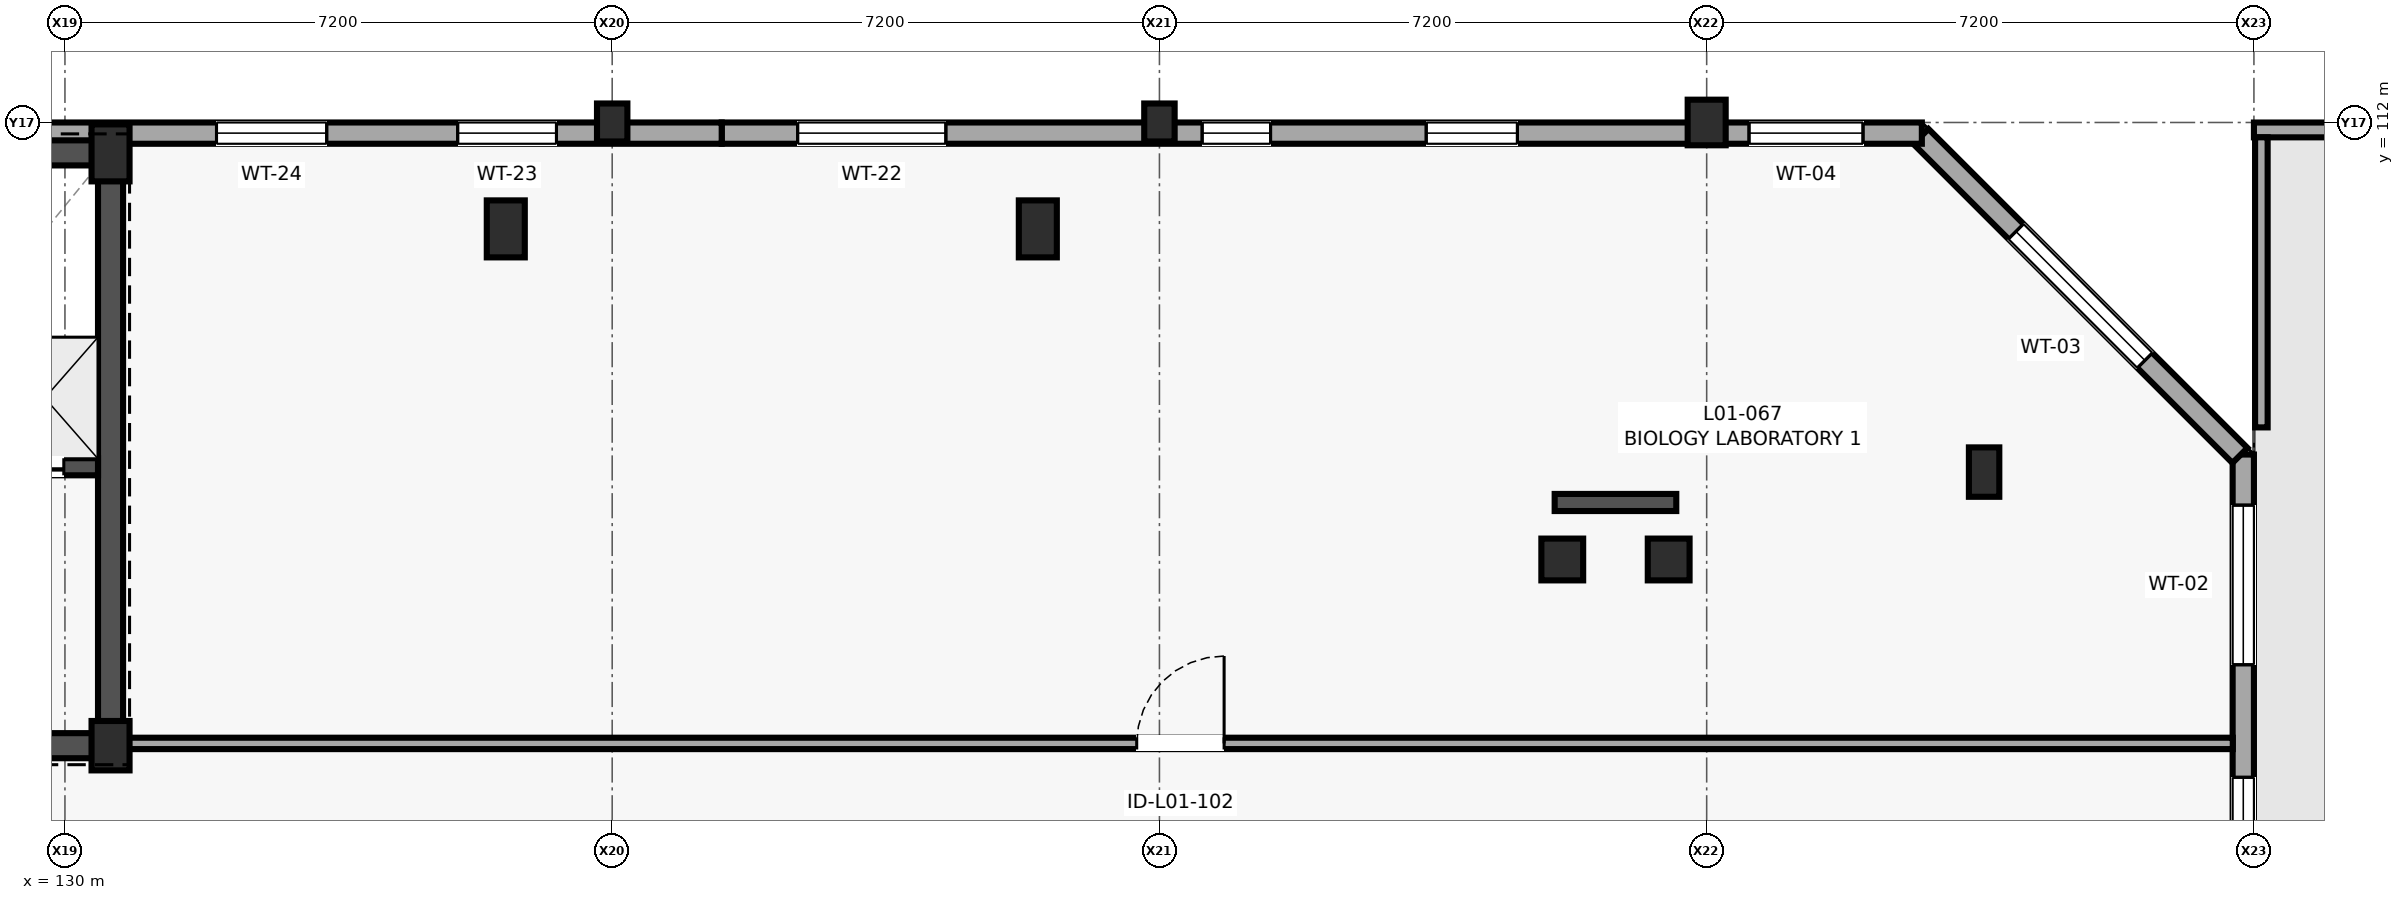
"""IFC4 building model, lengths in metres.
Left out: names, types, materials, properties, quantities, classifications, styles, units other than length and angle.
Written with IfcOpenShell. Run it as: python <this file> out.ifc"""

import sys

from ifc_helpers import new_model, si_unit, direction, frame, frame_2d, origin, origin_2d, place, context, subcontext, project, spatial, rectangle, extrude, element, fill, save


model = new_model("IFC4")
c1 = context("Model", 3, precision=1e-05, world=origin(), true_north=direction((0.0, 1.0)))
c2 = subcontext(c1, "Body", "Model", "MODEL_VIEW")
j1 = project(units=[si_unit("LENGTHUNIT", "METRE"), si_unit("PLANEANGLEUNIT", "RADIAN")], contexts=[c1])
p1 = place(None, origin())
s1 = spatial("IfcSite", under=j1, at=p1, CompositionType="ELEMENT")
p2 = place(p1, origin())
s2 = spatial("IfcBuilding", under=s1, at=p2, CompositionType="ELEMENT")
p3 = place(p2, frame((0.0, 0.0, 4.2)))
s3 = spatial("IfcBuildingStorey", under=s2, at=p3, CompositionType="ELEMENT", Elevation=4.2)
p4 = place(p3, frame((130.6, 103.8, 0.0), z_axis=(0.0, 0.0, 1.0), x_axis=(1.0, 0.0, 0.0)))
e1 = element("IfcColumn", 1, at=p4, inside=s3, PredefinedType="COLUMN", context=c2, shape_type="SweptSolid", body=[
    extrude(rectangle(XDim=0.5, YDim=0.65, at=origin_2d()), origin(), (0.0, 0.0, 1.0), 4.0),
])
for number, where, z_axis, x_axis in (
    (2, (130.6, 111.6, 0.0), (0.0, 0.0, 1.0), (1.0, 0.0, 0.0)),
    (3, (135.8, 110.6, 0.0), (0.0, 0.0, 1.0), (1.0, 0.0, 0.0)),
):
    element("IfcColumn", number, at=place(p3, frame(where, z_axis=z_axis, x_axis=x_axis)), inside=s3, PredefinedType="COLUMN", context=c2, shape_type="SweptSolid", body=[
        extrude(rectangle(XDim=0.5, YDim=0.75, at=origin_2d()), origin(), (0.0, 0.0, 1.0), 4.0),
    ])
p5 = place(p3, frame((137.2, 112.0, 0.0), z_axis=(0.0, 0.0, 1.0), x_axis=(1.0, 0.0, 0.0)))
e4 = element("IfcColumn", 4, at=p5, inside=s3, PredefinedType="PILASTER", context=c2, shape_type="SweptSolid", body=[
    extrude(rectangle(XDim=0.4, YDim=0.5, at=origin_2d()), origin(), (0.0, 0.0, 1.0), 4.0),
])
p6 = place(p3, frame((142.8, 110.6, 0.0), z_axis=(0.0, 0.0, 1.0), x_axis=(1.0, 0.0, 0.0)))
e5 = element("IfcColumn", 5, at=p6, inside=s3, PredefinedType="COLUMN", context=c2, shape_type="SweptSolid", body=[
    extrude(rectangle(XDim=0.5, YDim=0.75, at=origin_2d()), origin(), (0.0, 0.0, 1.0), 4.0),
])
p7 = place(p3, frame((144.4, 112.0, 0.0), z_axis=(0.0, 0.0, 1.0), x_axis=(1.0, 0.0, 0.0)))
e6 = element("IfcColumn", 6, at=p7, inside=s3, PredefinedType="PILASTER", context=c2, shape_type="SweptSolid", body=[
    extrude(rectangle(XDim=0.4, YDim=0.5, at=origin_2d()), origin(), (0.0, 0.0, 1.0), 4.0),
])
for number, where, z_axis, x_axis in (
    (7, (149.7, 106.25, 0.0), (0.0, 0.0, 1.0), (1.0, 0.0, 0.0)),
    (8, (151.1, 106.25, 0.0), (0.0, 0.0, 1.0), (1.0, 0.0, 0.0)),
):
    element("IfcColumn", number, at=place(p3, frame(where, z_axis=z_axis, x_axis=x_axis)), inside=s3, PredefinedType="COLUMN", context=c2, shape_type="SweptSolid", body=[
        extrude(rectangle(XDim=0.55, YDim=0.55, at=origin_2d()), origin(), (0.0, 0.0, 1.0), 4.0),
    ])
p8 = place(p3, frame((151.6, 112.0, 0.0), z_axis=(0.0, 0.0, 1.0), x_axis=(1.0, 0.0, 0.0)))
e9 = element("IfcColumn", 9, at=p8, inside=s3, PredefinedType="PILASTER", context=c2, shape_type="SweptSolid", body=[
    extrude(rectangle(XDim=0.5, YDim=0.6, at=origin_2d()), origin(), (0.0, 0.0, 1.0), 4.0),
])
p9 = place(p3, frame((155.25, 107.4, 0.0), z_axis=(0.0, 0.0, 1.0), x_axis=(1.0, 0.0, 0.0)))
e10 = element("IfcColumn", 10, at=p9, inside=s3, PredefinedType="COLUMN", context=c2, shape_type="SweptSolid", body=[
    extrude(rectangle(XDim=0.4, YDim=0.65, at=origin_2d()), origin(), (0.0, 0.0, 1.0), 4.0),
])
p10 = place(p3, frame((158.66, 100.769, 0.0), z_axis=(0.0, 0.0, 1.0), x_axis=(0.0, 1.0, 0.0)))
e11 = element("IfcWall", 11, at=p10, inside=s3, PredefinedType="SOLIDWALL", context=c2, shape_type="SweptSolid", body=[
    extrude(rectangle(XDim=6.862, YDim=0.28, at=frame_2d((3.431, 0.0))), origin(), (0.0, 0.0, 1.0), 3.78),
])
p11 = place(p10, frame((0.815, 0.0, 0.85)))
e12 = element("IfcOpeningElement", 12, at=p11, cuts=e11, PredefinedType="OPENING", context=c2, shape_type="SweptSolid", body=[
    extrude(rectangle(XDim=1.8, YDim=1.8, at=frame_2d((0.9, 0.9))), frame((0.0, 0.15, 0.0), z_axis=(0.0, -1.0, 0.0), x_axis=(1.0, 0.0, 0.0)), (0.0, 0.0, 1.0), 0.3),
])
p12 = place(p10, frame((4.096, 0.0, 0.85)))
e13 = element("IfcOpeningElement", 13, at=p12, cuts=e11, PredefinedType="OPENING", context=c2, shape_type="SweptSolid", body=[
    extrude(rectangle(XDim=2.1, YDim=1.8, at=frame_2d((1.05, 0.9))), frame((0.0, 0.15, 0.0), z_axis=(0.0, -1.0, 0.0), x_axis=(1.0, 0.0, 0.0)), (0.0, 0.0, 1.0), 0.3),
])
p13 = place(p3, frame((158.616, 107.619, 0.0), z_axis=(0.0, 0.0, 1.0), x_axis=(-0.707106781187, 0.707106781187, 0.0)))
e14 = element("IfcWall", 14, at=p13, inside=s3, PredefinedType="SOLIDWALL", context=c2, shape_type="SweptSolid", body=[
    extrude(rectangle(XDim=5.936, YDim=0.28, at=frame_2d((2.968, 0.0))), origin(), (0.0, 0.0, 1.0), 3.78),
])
p14 = place(p13, frame((1.768, 0.0, 0.85)))
e15 = element("IfcOpeningElement", 15, at=p14, cuts=e14, PredefinedType="OPENING", context=c2, shape_type="SweptSolid", body=[
    extrude(rectangle(XDim=2.4, YDim=1.85, at=frame_2d((1.2, 0.925))), frame((0.0, 0.15, 0.0), z_axis=(0.0, -1.0, 0.0), x_axis=(1.0, 0.0, 0.0)), (0.0, 0.0, 1.0), 0.3),
])
p15 = place(p3, frame((154.431, 111.86, 0.0), z_axis=(0.0, 0.0, 1.0), x_axis=(-1.0, 0.0, 0.0)))
e16 = element("IfcWall", 16, at=p15, inside=s3, PredefinedType="SOLIDWALL", context=c2, shape_type="SweptSolid", body=[
    extrude(rectangle(XDim=15.79, YDim=0.28, at=frame_2d((7.895, 0.0))), origin(), (0.0, 0.0, 1.0), 2.965),
])
p16 = place(p15, frame((0.774, 0.0, 0.85)))
e17 = element("IfcOpeningElement", 17, at=p16, cuts=e16, PredefinedType="OPENING", context=c2, shape_type="SweptSolid", body=[
    extrude(rectangle(XDim=1.5, YDim=1.65, at=frame_2d((0.75, 0.825))), frame((0.0, 0.15, 0.0), z_axis=(0.0, -1.0, 0.0), x_axis=(1.0, 0.0, 0.0)), (0.0, 0.0, 1.0), 0.3),
])
p17 = place(p15, frame((5.321, 0.0, 0.85)))
e18 = element("IfcOpeningElement", 18, at=p17, cuts=e16, PredefinedType="OPENING", context=c2, shape_type="SweptSolid", body=[
    extrude(rectangle(XDim=1.2, YDim=1.65, at=frame_2d((0.6, 0.825))), frame((0.0, 0.15, 0.0), z_axis=(0.0, -1.0, 0.0), x_axis=(1.0, 0.0, 0.0)), (0.0, 0.0, 1.0), 0.3),
])
p18 = place(p15, frame((8.569, 0.0, 1.05)))
e19 = element("IfcOpeningElement", 19, at=p18, cuts=e16, PredefinedType="OPENING", context=c2, shape_type="SweptSolid", body=[
    extrude(rectangle(XDim=0.9, YDim=1.5, at=frame_2d((0.45, 0.75))), frame((0.0, 0.15, 0.0), z_axis=(0.0, -1.0, 0.0), x_axis=(1.0, 0.0, 0.0)), (0.0, 0.0, 1.0), 0.3),
])
p19 = place(p15, frame((12.841, 0.0, 1.05)))
e20 = element("IfcOpeningElement", 20, at=p19, cuts=e16, PredefinedType="OPENING", context=c2, shape_type="SweptSolid", body=[
    extrude(rectangle(XDim=1.95, YDim=1.5, at=frame_2d((0.975, 0.75))), frame((0.0, 0.15, 0.0), z_axis=(0.0, -1.0, 0.0), x_axis=(1.0, 0.0, 0.0)), (0.0, 0.0, 1.0), 0.3),
])
p20 = place(p3, frame((138.641, 111.86, 0.0), z_axis=(0.0, 0.0, 1.0), x_axis=(-1.0, 0.0, 0.0)))
e21 = element("IfcWall", 21, at=p20, inside=s3, PredefinedType="SOLIDWALL", context=c2, shape_type="SweptSolid", body=[
    extrude(rectangle(XDim=15.791, YDim=0.28, at=frame_2d((7.896, 0.0))), origin(), (0.0, 0.0, 1.0), 3.015),
])
p21 = place(p20, frame((2.174, 0.0, 1.05)))
e22 = element("IfcOpeningElement", 22, at=p21, cuts=e21, PredefinedType="OPENING", context=c2, shape_type="SweptSolid", body=[
    extrude(rectangle(XDim=1.3, YDim=1.6, at=frame_2d((0.65, 0.8))), frame((0.0, 0.15, 0.0), z_axis=(0.0, -1.0, 0.0), x_axis=(1.0, 0.0, 0.0)), (0.0, 0.0, 1.0), 0.3),
])
p22 = place(p20, frame((5.197, 0.0, 0.85)))
e23 = element("IfcOpeningElement", 23, at=p22, cuts=e21, PredefinedType="OPENING", context=c2, shape_type="SweptSolid", body=[
    extrude(rectangle(XDim=1.45, YDim=1.7, at=frame_2d((0.725, 0.85))), frame((0.0, 0.15, 0.0), z_axis=(0.0, -1.0, 0.0), x_axis=(1.0, 0.0, 0.0)), (0.0, 0.0, 1.0), 0.3),
])
p23 = place(p3, frame((164.044, 111.902, 0.0), z_axis=(0.0, 0.0, 1.0), x_axis=(-1.0, 0.0, 0.0)))
e24 = element("IfcWall", 24, at=p23, inside=s3, PredefinedType="PARAPET", context=c2, shape_type="SweptSolid", body=[
    extrude(rectangle(XDim=5.244, YDim=0.195, at=frame_2d((2.622, 0.0))), origin(), (0.0, 0.0, 1.0), 1.12),
])
p24 = place(p3, frame((158.898, 111.805, 0.0), z_axis=(0.0, 0.0, 1.0), x_axis=(0.0, -1.0, 0.0)))
e25 = element("IfcWall", 25, at=p24, inside=s3, PredefinedType="PARAPET", context=c2, shape_type="SweptSolid", body=[
    extrude(rectangle(XDim=3.817, YDim=0.165, at=frame_2d((1.908, 0.0))), origin(), (0.0, 0.0, 1.0), 1.12),
])
p25 = place(p3, frame((123.235, 103.8, 0.0), z_axis=(0.0, 0.0, 1.0), x_axis=(1.0, 0.0, 0.0)))
e26 = element("IfcWall", 26, at=p25, inside=s3, PredefinedType="SHEAR", context=c2, shape_type="SweptSolid", body=[
    extrude(rectangle(XDim=7.53, YDim=0.33, at=frame_2d((3.765, 0.0))), origin(), (0.0, 0.0, 1.0), 3.78),
])
p26 = place(p25, frame((5.015, 0.0, 0.0)))
e27 = element("IfcOpeningElement", 27, at=p26, cuts=e26, PredefinedType="OPENING", context=c2, shape_type="SweptSolid", body=[
    extrude(rectangle(XDim=1.05, YDim=2.15, at=frame_2d((0.525, 1.075))), frame((0.0, 0.175, 0.0), z_axis=(0.0, -1.0, 0.0), x_axis=(1.0, 0.0, 0.0)), (0.0, 0.0, 1.0), 0.35),
])
p27 = place(p25, frame((1.565, 0.0, 0.0)))
e28 = element("IfcOpeningElement", 28, at=p27, cuts=e26, PredefinedType="OPENING", context=c2, shape_type="SweptSolid", body=[
    extrude(rectangle(XDim=1.1, YDim=2.15, at=frame_2d((0.55, 1.075))), frame((0.0, 0.175, 0.0), z_axis=(0.0, -1.0, 0.0), x_axis=(1.0, 0.0, 0.0)), (0.0, 0.0, 1.0), 0.35),
])
p28 = place(p3, frame((123.235, 111.6, 0.0), z_axis=(0.0, 0.0, 1.0), x_axis=(1.0, 0.0, 0.0)))
e29 = element("IfcWall", 29, at=p28, inside=s3, PredefinedType="SHEAR", context=c2, shape_type="SweptSolid", body=[
    extrude(rectangle(XDim=7.53, YDim=0.33, at=frame_2d((3.765, 0.0))), origin(), (0.0, 0.0, 1.0), 3.78),
])
p29 = place(p3, frame((130.6, 103.965, 0.0), z_axis=(0.0, 0.0, 1.0), x_axis=(0.0, 1.0, 0.0)))
e30 = element("IfcWall", 30, at=p29, inside=s3, PredefinedType="SHEAR", context=c2, shape_type="SweptSolid", body=[
    extrude(rectangle(XDim=7.47, YDim=0.33, at=frame_2d((3.735, 0.0))), origin(), (0.0, 0.0, 1.0), 3.78),
])
p30 = place(p3, frame((127.285, 107.47, 0.0), z_axis=(0.0, 0.0, 1.0), x_axis=(1.0, 0.0, 0.0)))
e31 = element("IfcWall", 31, at=p30, inside=s3, PredefinedType="SHEAR", context=c2, shape_type="SweptSolid", body=[
    extrude(rectangle(XDim=3.15, YDim=0.225, at=frame_2d((1.575, 0.0))), origin(), (0.0, 0.0, 1.0), 3.78),
])
p31 = place(p30, frame((0.2, 0.0, 0.0)))
e32 = element("IfcOpeningElement", 32, at=p31, cuts=e31, PredefinedType="OPENING", context=c2, shape_type="SweptSolid", body=[
    extrude(rectangle(XDim=0.95, YDim=2.15, at=frame_2d((0.475, 1.075))), frame((0.0, 0.123, 0.0), z_axis=(0.0, -1.0, 0.0), x_axis=(1.0, 0.0, 0.0)), (0.0, 0.0, 1.0), 0.245),
])
p32 = place(p30, frame((1.65, 0.0, 0.0)))
e33 = element("IfcOpeningElement", 33, at=p32, cuts=e31, PredefinedType="OPENING", context=c2, shape_type="SweptSolid", body=[
    extrude(rectangle(XDim=1.05, YDim=2.2, at=frame_2d((0.525, 1.1))), frame((0.0, 0.123, 0.0), z_axis=(0.0, -1.0, 0.0), x_axis=(1.0, 0.0, 0.0)), (0.0, 0.0, 1.0), 0.245),
])
p33 = place(p3, frame((149.6, 107.0, 0.0), z_axis=(0.0, 0.0, 1.0), x_axis=(1.0, 0.0, 0.0)))
e34 = element("IfcWall", 34, at=p33, inside=s3, PredefinedType="SHEAR", context=c2, shape_type="SweptSolid", body=[
    extrude(rectangle(XDim=1.6, YDim=0.225, at=frame_2d((0.8, 0.0))), origin(), (0.0, 0.0, 1.0), 3.72),
])
p34 = place(p3, frame((130.83, 103.83, 0.0), z_axis=(0.0, 0.0, 1.0), x_axis=(1.0, 0.0, 0.0)))
e35 = element("IfcWall", 35, at=p34, inside=s3, PredefinedType="PARTITIONING", context=c2, shape_type="SweptSolid", body=[
    extrude(rectangle(XDim=27.692, YDim=0.15, at=frame_2d((13.846, 0.0))), origin(), (0.0, 0.0, 1.0), 3.715),
])
p35 = place(p34, frame((13.271, 0.0, 0.0)))
e36 = element("IfcOpeningElement", 36, at=p35, cuts=e35, PredefinedType="OPENING", context=c2, shape_type="SweptSolid", body=[
    extrude(rectangle(XDim=1.15, YDim=2.2, at=frame_2d((0.575, 1.1))), frame((0.0, 0.085, 0.0), z_axis=(0.0, -1.0, 0.0), x_axis=(1.0, 0.0, 0.0)), (0.0, 0.0, 1.0), 0.17),
])
p36 = place(p11, origin())
e37 = element("IfcWindow", 37, at=p36, inside=s3, PartitioningType="SINGLE_PANEL", PredefinedType="WINDOW", context=c2, shape_type="SweptSolid", body=[
    extrude(rectangle(XDim=1.8, YDim=1.8, at=frame_2d((0.9, 0.9))), frame((0.0, 0.03, 0.0), z_axis=(0.0, -1.0, 0.0), x_axis=(1.0, 0.0, 0.0)), (0.0, 0.0, 1.0), 0.06),
])
fill(e12, e37)
p37 = place(p12, origin())
e38 = element("IfcWindow", 38, at=p37, inside=s3, PartitioningType="SINGLE_PANEL", PredefinedType="WINDOW", context=c2, shape_type="SweptSolid", body=[
    extrude(rectangle(XDim=2.1, YDim=1.8, at=frame_2d((1.05, 0.9))), frame((0.0, 0.03, 0.0), z_axis=(0.0, -1.0, 0.0), x_axis=(1.0, 0.0, 0.0)), (0.0, 0.0, 1.0), 0.06),
])
fill(e13, e38)
p38 = place(p14, origin())
e39 = element("IfcWindow", 39, at=p38, inside=s3, PartitioningType="SINGLE_PANEL", PredefinedType="WINDOW", context=c2, shape_type="SweptSolid", body=[
    extrude(rectangle(XDim=2.4, YDim=1.85, at=frame_2d((1.2, 0.925))), frame((0.0, 0.03, 0.0), z_axis=(0.0, -1.0, 0.0), x_axis=(1.0, 0.0, 0.0)), (0.0, 0.0, 1.0), 0.06),
])
fill(e15, e39)
p39 = place(p16, origin())
e40 = element("IfcWindow", 40, at=p39, inside=s3, PartitioningType="SINGLE_PANEL", PredefinedType="WINDOW", context=c2, shape_type="SweptSolid", body=[
    extrude(rectangle(XDim=1.5, YDim=1.65, at=frame_2d((0.75, 0.825))), frame((0.0, 0.03, 0.0), z_axis=(0.0, -1.0, 0.0), x_axis=(1.0, 0.0, 0.0)), (0.0, 0.0, 1.0), 0.06),
])
fill(e17, e40)
p40 = place(p17, origin())
e41 = element("IfcWindow", 41, at=p40, inside=s3, PartitioningType="SINGLE_PANEL", PredefinedType="WINDOW", context=c2, shape_type="SweptSolid", body=[
    extrude(rectangle(XDim=1.2, YDim=1.65, at=frame_2d((0.6, 0.825))), frame((0.0, 0.03, 0.0), z_axis=(0.0, -1.0, 0.0), x_axis=(1.0, 0.0, 0.0)), (0.0, 0.0, 1.0), 0.06),
])
fill(e18, e41)
p41 = place(p18, origin())
e42 = element("IfcWindow", 42, at=p41, inside=s3, PartitioningType="SINGLE_PANEL", PredefinedType="WINDOW", context=c2, shape_type="SweptSolid", body=[
    extrude(rectangle(XDim=0.9, YDim=1.5, at=frame_2d((0.45, 0.75))), frame((0.0, 0.03, 0.0), z_axis=(0.0, -1.0, 0.0), x_axis=(1.0, 0.0, 0.0)), (0.0, 0.0, 1.0), 0.06),
])
fill(e19, e42)
p42 = place(p19, origin())
e43 = element("IfcWindow", 43, at=p42, inside=s3, PartitioningType="SINGLE_PANEL", PredefinedType="WINDOW", context=c2, shape_type="SweptSolid", body=[
    extrude(rectangle(XDim=1.95, YDim=1.5, at=frame_2d((0.975, 0.75))), frame((0.0, 0.03, 0.0), z_axis=(0.0, -1.0, 0.0), x_axis=(1.0, 0.0, 0.0)), (0.0, 0.0, 1.0), 0.06),
])
fill(e20, e43)
p43 = place(p21, origin())
e44 = element("IfcWindow", 44, at=p43, inside=s3, PartitioningType="SINGLE_PANEL", PredefinedType="WINDOW", context=c2, shape_type="SweptSolid", body=[
    extrude(rectangle(XDim=1.3, YDim=1.6, at=frame_2d((0.65, 0.8))), frame((0.0, 0.03, 0.0), z_axis=(0.0, -1.0, 0.0), x_axis=(1.0, 0.0, 0.0)), (0.0, 0.0, 1.0), 0.06),
])
fill(e22, e44)
p44 = place(p22, origin())
e45 = element("IfcWindow", 45, at=p44, inside=s3, PartitioningType="SINGLE_PANEL", PredefinedType="WINDOW", context=c2, shape_type="SweptSolid", body=[
    extrude(rectangle(XDim=1.45, YDim=1.7, at=frame_2d((0.725, 0.85))), frame((0.0, 0.03, 0.0), z_axis=(0.0, -1.0, 0.0), x_axis=(1.0, 0.0, 0.0)), (0.0, 0.0, 1.0), 0.06),
])
fill(e23, e45)
p45 = place(p32, origin())
e46 = element("IfcDoor", 46, at=p45, inside=s3, OperationType="SLIDING_TO_RIGHT", PredefinedType="DOOR", context=c2, shape_type="SweptSolid", body=[
    extrude(rectangle(XDim=1.05, YDim=2.2, at=frame_2d((0.525, 1.1))), frame((0.0, 0.025, 0.0), z_axis=(0.0, -1.0, 0.0), x_axis=(1.0, 0.0, 0.0)), (0.0, 0.0, 1.0), 0.05),
])
fill(e33, e46)
p46 = place(p35, origin())
e47 = element("IfcDoor", 47, at=p46, inside=s3, OperationType="SINGLE_SWING_RIGHT", PredefinedType="DOOR", context=c2, shape_type="SweptSolid", body=[
    extrude(rectangle(XDim=1.15, YDim=2.2, at=frame_2d((0.575, 1.1))), frame((0.0, 0.025, 0.0), z_axis=(0.0, -1.0, 0.0), x_axis=(1.0, 0.0, 0.0)), (0.0, 0.0, 1.0), 0.05),
])
fill(e36, e47)
save(model, sys.argv[1])
